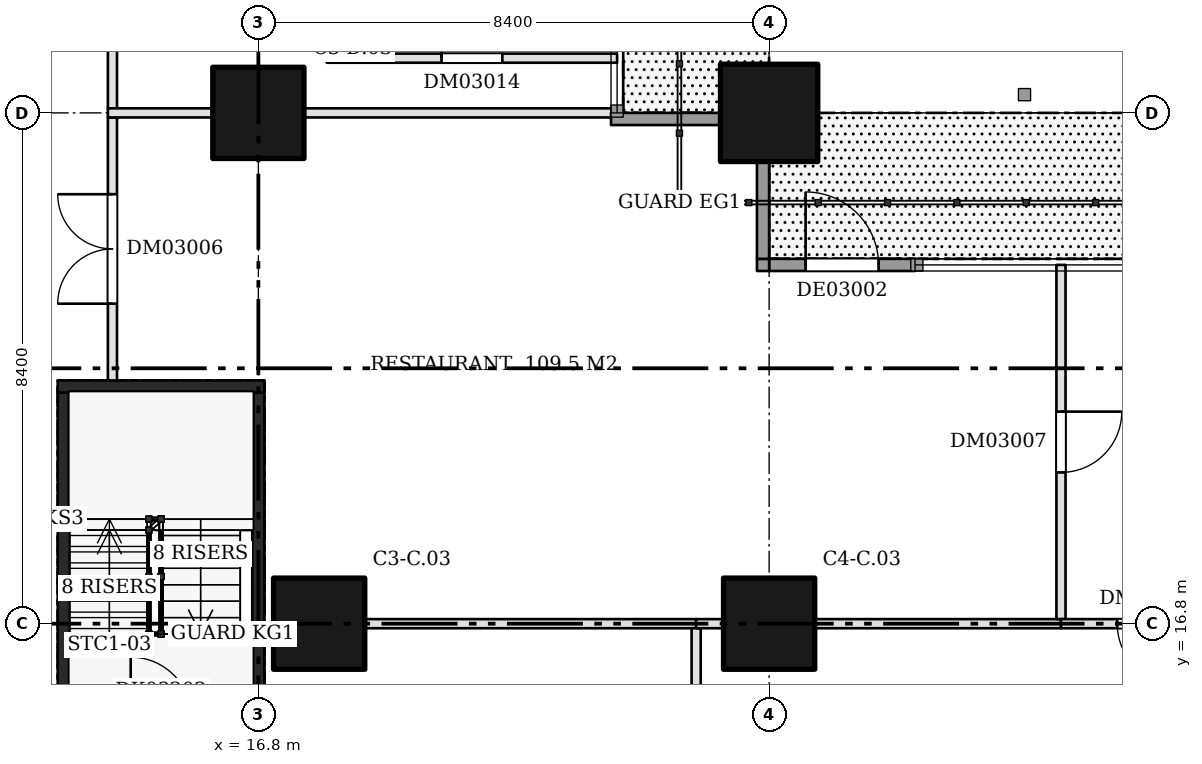
"""IFC4 building model, lengths in metres.
Left out: names, types, materials, properties, quantities, classifications, styles, units other than length and angle.
Written with IfcOpenShell. Run it as: python <this file> out.ifc"""

import sys

from ifc_helpers import new_model, si_unit, direction, frame, frame_2d, origin, origin_2d, place, context, subcontext, project, spatial, rectangle, extrude, element, fill, save


model = new_model("IFC4")
c1 = context("Model", 3, precision=1e-05, world=origin(), true_north=direction((0.0, 1.0)))
c2 = subcontext(c1, "Body", "Model", "MODEL_VIEW")
j1 = project(units=[si_unit("LENGTHUNIT", "METRE"), si_unit("PLANEANGLEUNIT", "RADIAN")], contexts=[c1])
p1 = place(None, origin())
s1 = spatial("IfcSite", under=j1, at=p1, CompositionType="ELEMENT")
p2 = place(p1, origin())
s2 = spatial("IfcBuilding", under=s1, at=p2, CompositionType="ELEMENT")
p3 = place(p2, frame((0.0, 0.0, 19.8)))
s3 = spatial("IfcBuildingStorey", under=s2, at=p3, CompositionType="ELEMENT", Elevation=19.8)
for number, where, z_axis, x_axis in (
    (1, (17.8, 16.8, 0.0), (0.0, 0.0, 1.0), (1.0, 0.0, 0.0)),
    (2, (16.8, 25.2, 0.0), (0.0, 0.0, 1.0), (1.0, 0.0, 0.0)),
    (3, (25.2, 16.8, 0.0), (0.0, 0.0, 1.0), (1.0, 0.0, 0.0)),
):
    element("IfcColumn", number, at=place(p3, frame(where, z_axis=z_axis, x_axis=x_axis)), inside=s3, PredefinedType="COLUMN", context=c2, shape_type="SweptSolid", body=[
        extrude(rectangle(XDim=1.5, YDim=1.5, at=origin_2d()), origin(), (0.0, 0.0, 1.0), 5.12),
    ])
p4 = place(p3, frame((25.2, 25.2, 0.0), z_axis=(0.0, 0.0, 1.0), x_axis=(1.0, 0.0, 0.0)))
e4 = element("IfcColumn", 4, at=p4, inside=s3, PredefinedType="COLUMN", context=c2, shape_type="SweptSolid", body=[
    extrude(rectangle(XDim=1.6, YDim=1.6, at=origin_2d()), origin(), (0.0, 0.0, 1.0), 5.12),
])
p5 = place(p3, frame((13.6, 13.8, 0.0), z_axis=(0.0, 0.0, 1.0), x_axis=(0.0, 1.0, 0.0)))
e5 = element("IfcWall", 5, at=p5, inside=s3, PredefinedType="SHEAR", context=c2, shape_type="SweptSolid", body=[
    extrude(rectangle(XDim=6.8, YDim=0.2, at=frame_2d((3.4, 0.0))), origin(), (0.0, 0.0, 1.0), 5.12),
])
p6 = place(p5, frame((0.2, 0.0, 0.0)))
e6 = element("IfcOpeningElement", 6, at=p6, cuts=e5, PredefinedType="OPENING", context=c2, shape_type="SweptSolid", body=[
    extrude(rectangle(XDim=1.0, YDim=2.1, at=frame_2d((0.5, 1.05))), frame((0.0, 0.11, 0.0), z_axis=(0.0, -1.0, 0.0), x_axis=(1.0, 0.0, 0.0)), (0.0, 0.0, 1.0), 0.22),
])
p7 = place(p3, frame((16.8, 13.8, 0.0), z_axis=(0.0, 0.0, 1.0), x_axis=(0.0, 1.0, 0.0)))
e7 = element("IfcWall", 7, at=p7, inside=s3, PredefinedType="SHEAR", context=c2, shape_type="SweptSolid", body=[
    extrude(rectangle(XDim=6.8, YDim=0.2, at=frame_2d((3.4, 0.0))), origin(), (0.0, 0.0, 1.0), 5.12),
])
p8 = place(p3, frame((13.5, 20.7, 0.0), z_axis=(0.0, 0.0, 1.0), x_axis=(1.0, 0.0, 0.0)))
e8 = element("IfcWall", 8, at=p8, inside=s3, PredefinedType="SHEAR", context=c2, shape_type="SweptSolid", body=[
    extrude(rectangle(XDim=3.4, YDim=0.2, at=frame_2d((1.7, 0.0))), origin(), (0.0, 0.0, 1.0), 5.12),
])
p9 = place(p3, frame((14.4, 20.8, 0.0), z_axis=(0.0, 0.0, 1.0), x_axis=(0.0, 1.0, 0.0)))
e9 = element("IfcWall", 9, at=p9, inside=s3, PredefinedType="PARTITIONING", context=c2, shape_type="SweptSolid", body=[
    extrude(rectangle(XDim=4.325, YDim=0.15, at=frame_2d((2.163, 0.0))), origin(), (0.0, 0.0, 1.0), 5.12),
])
p10 = place(p9, frame((1.262, 0.0, 0.0)))
e10 = element("IfcOpeningElement", 10, at=p10, cuts=e9, PredefinedType="OPENING", context=c2, shape_type="SweptSolid", body=[
    extrude(rectangle(XDim=1.8, YDim=2.1, at=frame_2d((0.9, 1.05))), frame((0.0, 0.085, 0.0), z_axis=(0.0, -1.0, 0.0), x_axis=(1.0, 0.0, 0.0)), (0.0, 0.0, 1.0), 0.17),
])
p11 = place(p3, frame((14.4, 25.275, 0.0), z_axis=(0.0, 0.0, 1.0), x_axis=(0.0, 1.0, 0.0)))
e11 = element("IfcWall", 11, at=p11, inside=s3, PredefinedType="PARTITIONING", context=c2, shape_type="SweptSolid", body=[
    extrude(rectangle(XDim=5.05, YDim=0.15, at=frame_2d((2.525, 0.0))), origin(), (0.0, 0.0, 1.0), 5.12),
])
p12 = place(p11, frame((2.025, 0.0, 0.0)))
e12 = element("IfcOpeningElement", 12, at=p12, cuts=e11, PredefinedType="OPENING", context=c2, shape_type="SweptSolid", body=[
    extrude(rectangle(XDim=1.0, YDim=2.1, at=frame_2d((0.5, 1.05))), frame((0.0, 0.085, 0.0), z_axis=(0.0, -1.0, 0.0), x_axis=(1.0, 0.0, 0.0)), (0.0, 0.0, 1.0), 0.17),
])
p13 = place(p3, frame((14.325, 25.2, 0.0), z_axis=(0.0, 0.0, 1.0), x_axis=(1.0, 0.0, 0.0)))
e13 = element("IfcWall", 13, at=p13, inside=s3, PredefinedType="PARTITIONING", context=c2, shape_type="SweptSolid", body=[
    extrude(rectangle(XDim=1.725, YDim=0.15, at=frame_2d((0.863, 0.0))), origin(), (0.0, 0.0, 1.0), 5.12),
])
p14 = place(p3, frame((17.55, 25.2, 0.0), z_axis=(0.0, 0.0, 1.0), x_axis=(1.0, 0.0, 0.0)))
e14 = element("IfcWall", 14, at=p14, inside=s3, PredefinedType="PARTITIONING", context=c2, shape_type="SweptSolid", body=[
    extrude(rectangle(XDim=5.15, YDim=0.15, at=frame_2d((2.575, 0.0))), origin(), (0.0, 0.0, 1.0), 5.12),
])
p15 = place(p3, frame((18.55, 16.8, 0.0), z_axis=(0.0, 0.0, 1.0), x_axis=(1.0, 0.0, 0.0)))
e15 = element("IfcWall", 15, at=p15, inside=s3, PredefinedType="PARTITIONING", context=c2, shape_type="SweptSolid", body=[
    extrude(rectangle(XDim=5.45, YDim=0.15, at=frame_2d((2.725, 0.0))), origin(), (0.0, 0.0, 1.0), 5.12),
])
p16 = place(p3, frame((18.0, 26.175, 0.0), z_axis=(0.0, 0.0, 1.0), x_axis=(0.0, 1.0, 0.0)))
e16 = element("IfcWall", 16, at=p16, inside=s3, PredefinedType="PARTITIONING", context=c2, shape_type="SweptSolid", body=[
    extrude(rectangle(XDim=3.35, YDim=0.15, at=frame_2d((1.675, 0.0))), origin(), (0.0, 0.0, 1.0), 5.12),
])
p17 = place(p3, frame((17.925, 26.1, 0.0), z_axis=(0.0, 0.0, 1.0), x_axis=(1.0, 0.0, 0.0)))
e17 = element("IfcWall", 17, at=p17, inside=s3, PredefinedType="PARTITIONING", context=c2, shape_type="SweptSolid", body=[
    extrude(rectangle(XDim=4.775, YDim=0.15, at=frame_2d((2.387, 0.0))), origin(), (0.0, 0.0, 1.0), 5.12),
])
p18 = place(p17, frame((1.887, 0.0, 0.0)))
e18 = element("IfcOpeningElement", 18, at=p18, cuts=e17, PredefinedType="OPENING", context=c2, shape_type="SweptSolid", body=[
    extrude(rectangle(XDim=1.0, YDim=2.1, at=frame_2d((0.5, 1.05))), frame((0.0, 0.085, 0.0), z_axis=(0.0, -1.0, 0.0), x_axis=(1.0, 0.0, 0.0)), (0.0, 0.0, 1.0), 0.17),
])
p19 = place(p3, frame((24.0, 14.475, 0.0), z_axis=(0.0, 0.0, 1.0), x_axis=(0.0, 1.0, 0.0)))
e19 = element("IfcWall", 19, at=p19, inside=s3, PredefinedType="PARTITIONING", context=c2, shape_type="SweptSolid", body=[
    extrude(rectangle(XDim=2.25, YDim=0.15, at=frame_2d((1.125, 0.0))), origin(), (0.0, 0.0, 1.0), 5.12),
])
p20 = place(p3, frame((24.0, 16.8, 0.0), z_axis=(0.0, 0.0, 1.0), x_axis=(1.0, 0.0, 0.0)))
e20 = element("IfcWall", 20, at=p20, inside=s3, PredefinedType="PARTITIONING", context=c2, shape_type="SweptSolid", body=[
    extrude(rectangle(XDim=0.45, YDim=0.15, at=frame_2d((0.225, 0.0))), origin(), (0.0, 0.0, 1.0), 5.12),
])
p21 = place(p3, frame((25.95, 16.8, 0.0), z_axis=(0.0, 0.0, 1.0), x_axis=(1.0, 0.0, 0.0)))
e21 = element("IfcWall", 21, at=p21, inside=s3, PredefinedType="PARTITIONING", context=c2, shape_type="SweptSolid", body=[
    extrude(rectangle(XDim=4.05, YDim=0.15, at=frame_2d((2.025, 0.0))), origin(), (0.0, 0.0, 1.0), 5.12),
])
p22 = place(p3, frame((30.0, 16.875, 0.0), z_axis=(0.0, 0.0, 1.0), x_axis=(0.0, 1.0, 0.0)))
e22 = element("IfcWall", 22, at=p22, inside=s3, PredefinedType="PARTITIONING", context=c2, shape_type="SweptSolid", body=[
    extrude(rectangle(XDim=5.825, YDim=0.15, at=frame_2d((2.913, 0.0))), origin(), (0.0, 0.0, 1.0), 5.12),
])
p23 = place(p22, frame((2.413, 0.0, 0.0)))
e23 = element("IfcOpeningElement", 23, at=p23, cuts=e22, PredefinedType="OPENING", context=c2, shape_type="SweptSolid", body=[
    extrude(rectangle(XDim=1.0, YDim=2.1, at=frame_2d((0.5, 1.05))), frame((0.0, 0.085, 0.0), z_axis=(0.0, -1.0, 0.0), x_axis=(1.0, 0.0, 0.0)), (0.0, 0.0, 1.0), 0.17),
])
p24 = place(p3, frame((30.0, 16.8, 0.0), z_axis=(0.0, 0.0, 1.0), x_axis=(1.0, 0.0, 0.0)))
e24 = element("IfcWall", 24, at=p24, inside=s3, PredefinedType="PARTITIONING", context=c2, shape_type="SweptSolid", body=[
    extrude(rectangle(XDim=2.85, YDim=0.15, at=frame_2d((1.425, 0.0))), origin(), (0.0, 0.0, 1.0), 5.12),
])
p25 = place(p24, frame((0.925, 0.0, 0.0)))
e25 = element("IfcOpeningElement", 25, at=p25, cuts=e24, PredefinedType="OPENING", context=c2, shape_type="SweptSolid", body=[
    extrude(rectangle(XDim=1.0, YDim=2.1, at=frame_2d((0.5, 1.05))), frame((0.0, 0.085, 0.0), z_axis=(0.0, -1.0, 0.0), x_axis=(1.0, 0.0, 0.0)), (0.0, 0.0, 1.0), 0.17),
])
p26 = place(p3, frame((27.6, 22.7, 0.0), z_axis=(0.0, 0.0, 1.0), x_axis=(-1.0, 0.0, 0.0)))
e26 = element("IfcWall", 26, at=p26, inside=s3, PredefinedType="SOLIDWALL", context=c2, shape_type="SweptSolid", body=[
    extrude(rectangle(XDim=2.4, YDim=0.2, at=frame_2d((1.2, 0.0))), origin(), (0.0, 0.0, 1.0), 5.12),
])
p27 = place(p26, frame((0.6, 0.0, 0.0)))
e27 = element("IfcOpeningElement", 27, at=p27, cuts=e26, PredefinedType="OPENING", context=c2, shape_type="SweptSolid", body=[
    extrude(rectangle(XDim=1.2, YDim=2.4, at=frame_2d((0.6, 1.2))), frame((0.0, 0.11, 0.0), z_axis=(0.0, -1.0, 0.0), x_axis=(1.0, 0.0, 0.0)), (0.0, 0.0, 1.0), 0.22),
])
p28 = place(p3, frame((25.2, 22.7, 0.0), z_axis=(0.0, 0.0, 1.0), x_axis=(-1.0, 0.0, 0.0)))
e28 = element("IfcWall", 28, at=p28, inside=s3, PredefinedType="SOLIDWALL", context=c2, shape_type="SweptSolid", body=[
    extrude(rectangle(XDim=0.2, YDim=0.2, at=frame_2d((0.1, 0.0))), origin(), (0.0, 0.0, 1.0), 5.12),
])
p29 = place(p3, frame((25.1, 22.8, 0.0), z_axis=(0.0, 0.0, 1.0), x_axis=(0.0, 1.0, 0.0)))
e29 = element("IfcWall", 29, at=p29, inside=s3, PredefinedType="SOLIDWALL", context=c2, shape_type="SweptSolid", body=[
    extrude(rectangle(XDim=1.6, YDim=0.2, at=frame_2d((0.8, 0.0))), origin(), (0.0, 0.0, 1.0), 5.12),
])
p30 = place(p3, frame((24.4, 25.1, 0.0), z_axis=(0.0, 0.0, 1.0), x_axis=(-1.0, 0.0, 0.0)))
e30 = element("IfcWall", 30, at=p30, inside=s3, PredefinedType="SOLIDWALL", context=c2, shape_type="SweptSolid", body=[
    extrude(rectangle(XDim=1.8, YDim=0.2, at=frame_2d((0.9, 0.0))), origin(), (0.0, 0.0, 1.0), 5.12),
])
p31 = place(p10, origin())
e31 = element("IfcDoor", 31, at=p31, inside=s3, OperationType="DOUBLE_DOOR_SINGLE_SWING", PredefinedType="DOOR", context=c2, shape_type="SweptSolid", body=[
    extrude(rectangle(XDim=1.8, YDim=2.1, at=frame_2d((0.9, 1.05))), frame((0.0, 0.025, 0.0), z_axis=(0.0, -1.0, 0.0), x_axis=(1.0, 0.0, 0.0)), (0.0, 0.0, 1.0), 0.05),
])
fill(e10, e31)
p32 = place(p23, frame((1.0, 0.0, 0.0), z_axis=(0.0, 0.0, 1.0), x_axis=(-1.0, 0.0, 0.0)))
e32 = element("IfcDoor", 32, at=p32, inside=s3, OperationType="SINGLE_SWING_LEFT", PredefinedType="DOOR", context=c2, shape_type="SweptSolid", body=[
    extrude(rectangle(XDim=1.0, YDim=2.1, at=frame_2d((0.5, 1.05))), frame((0.0, 0.025, 0.0), z_axis=(0.0, -1.0, 0.0), x_axis=(1.0, 0.0, 0.0)), (0.0, 0.0, 1.0), 0.05),
])
fill(e23, e32)
p33 = place(p25, frame((1.0, 0.0, 0.0), z_axis=(0.0, 0.0, 1.0), x_axis=(-1.0, 0.0, 0.0)))
e33 = element("IfcDoor", 33, at=p33, inside=s3, OperationType="SINGLE_SWING_LEFT", PredefinedType="DOOR", context=c2, shape_type="SweptSolid", body=[
    extrude(rectangle(XDim=1.0, YDim=2.1, at=frame_2d((0.5, 1.05))), frame((0.0, 0.025, 0.0), z_axis=(0.0, -1.0, 0.0), x_axis=(1.0, 0.0, 0.0)), (0.0, 0.0, 1.0), 0.05),
])
fill(e25, e33)
p34 = place(p18, origin())
e34 = element("IfcDoor", 34, at=p34, inside=s3, OperationType="SINGLE_SWING_LEFT", PredefinedType="DOOR", context=c2, shape_type="SweptSolid", body=[
    extrude(rectangle(XDim=1.0, YDim=2.1, at=frame_2d((0.5, 1.05))), frame((0.0, 0.025, 0.0), z_axis=(0.0, -1.0, 0.0), x_axis=(1.0, 0.0, 0.0)), (0.0, 0.0, 1.0), 0.05),
])
fill(e18, e34)
p35 = place(p27, frame((1.2, 0.0, 0.0), z_axis=(0.0, 0.0, 1.0), x_axis=(-1.0, 0.0, 0.0)))
e35 = element("IfcDoor", 35, at=p35, inside=s3, OperationType="SINGLE_SWING_LEFT", PredefinedType="DOOR", context=c2, shape_type="SweptSolid", body=[
    extrude(rectangle(XDim=1.2, YDim=2.4, at=frame_2d((0.6, 1.2))), frame((0.0, 0.025, 0.0), z_axis=(0.0, -1.0, 0.0), x_axis=(1.0, 0.0, 0.0)), (0.0, 0.0, 1.0), 0.05),
])
fill(e27, e35)
save(model, sys.argv[1])
